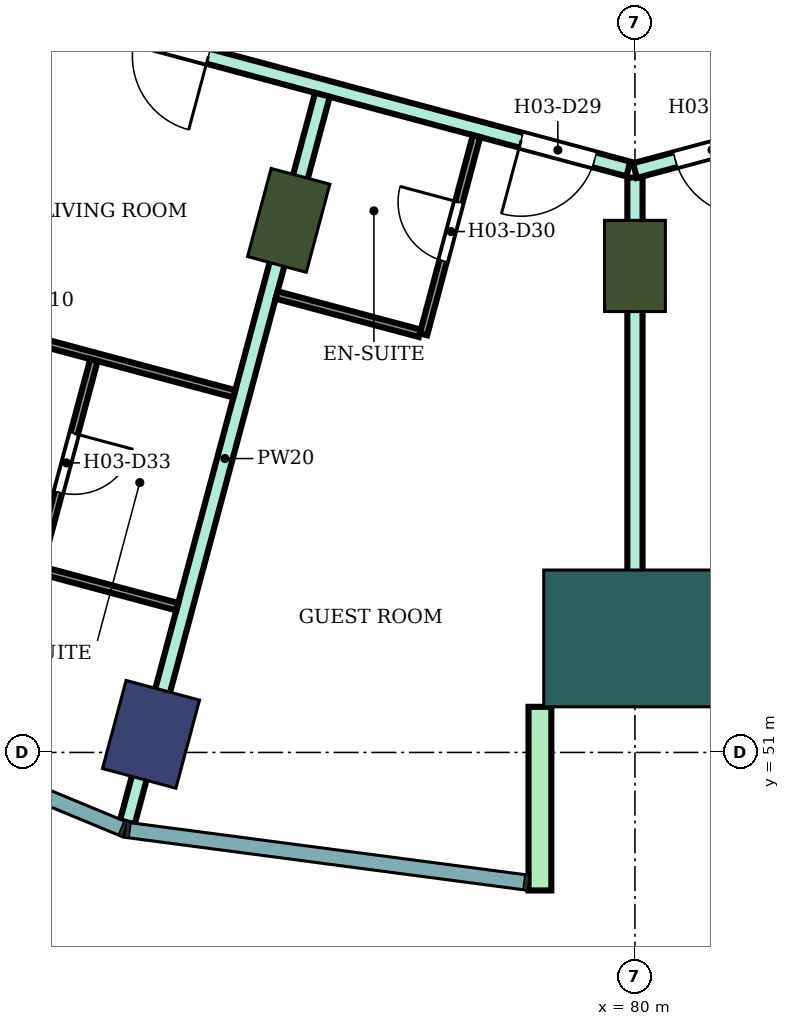
"""IFC4 building model, lengths in metres.
Left out: names, types, materials, properties, quantities, classifications, styles, units other than length and angle.
Written with IfcOpenShell. Run it as: python <this file> out.ifc"""

import sys

from ifc_helpers import new_model, si_unit, direction, frame, frame_2d, origin, origin_2d, place, context, subcontext, project, spatial, rectangle, extrude, element, fill, save


model = new_model("IFC4")
c1 = context("Model", 3, precision=1e-05, world=origin(), true_north=direction((0.0, 1.0)))
c2 = subcontext(c1, "Body", "Model", "MODEL_VIEW")
j1 = project(units=[si_unit("LENGTHUNIT", "METRE"), si_unit("PLANEANGLEUNIT", "RADIAN")], contexts=[c1])
p1 = place(None, origin())
s1 = spatial("IfcSite", under=j1, at=p1, CompositionType="ELEMENT")
p2 = place(p1, origin())
s2 = spatial("IfcBuilding", under=s1, at=p2, CompositionType="ELEMENT")
p3 = place(p2, frame((0.0, 0.0, 59.2)))
s3 = spatial("IfcBuildingStorey", under=s2, at=p3, CompositionType="ELEMENT", Elevation=59.2)
p4 = place(p3, frame((73.633, 51.238, 0.0), z_axis=(0.0, 0.0, 1.0), x_axis=(-0.258819045103, -0.965925826289, 0.0)))
e1 = element("IfcColumn", 1, at=p4, inside=s3, PredefinedType="COLUMN", context=c2, shape_type="SweptSolid", body=[
    extrude(rectangle(XDim=1.2, YDim=1.0, at=origin_2d()), origin(), (0.0, 0.0, 1.0), 3.8),
])
for number, where, z_axis, x_axis in (
    (2, (75.445, 58.0, 0.0), (0.0, 0.0, 1.0), (-0.259, -0.966, 0.0)),
    (3, (80.0, 57.4, 0.0), (0.0, 0.0, 1.0), (0.0, -1.0, 0.0)),
):
    element("IfcColumn", number, at=place(p3, frame(where, z_axis=z_axis, x_axis=x_axis)), inside=s3, PredefinedType="COLUMN", context=c2, shape_type="SweptSolid", body=[
        extrude(rectangle(XDim=1.2, YDim=0.8, at=origin_2d()), origin(), (0.0, 0.0, 1.0), 3.8),
    ])
p5 = place(p3, frame((80.0, 52.5, 0.0), z_axis=(0.0, 0.0, 1.0), x_axis=(0.0, -1.0, 0.0)))
e4 = element("IfcColumn", 4, at=p5, inside=s3, PredefinedType="COLUMN", context=c2, shape_type="SweptSolid", body=[
    extrude(rectangle(XDim=1.8, YDim=2.4, at=origin_2d()), origin(), (0.0, 0.0, 1.0), 3.8),
])
p6 = place(p3, frame((78.75, 51.6, 0.0), z_axis=(0.0, 0.0, 1.0), x_axis=(0.0, -1.0, 0.0)))
e5 = element("IfcWall", 5, at=p6, inside=s3, PredefinedType="NOTDEFINED", context=c2, shape_type="SweptSolid", body=[
    extrude(rectangle(XDim=2.416, YDim=0.3, at=frame_2d((1.208, 0.0))), origin(), (0.0, 0.0, 1.0), 3.8),
])
p7 = place(p3, frame((71.877, 60.831, 0.0), z_axis=(0.0, 0.0, 1.0), x_axis=(0.965852509869, -0.259092510851, 0.0)))
e6 = element("IfcWall", 6, at=p7, inside=s3, PredefinedType="PARTITIONING", context=c2, shape_type="SweptSolid", body=[
    extrude(rectangle(XDim=8.32, YDim=0.2, at=frame_2d((4.16, 0.0))), origin(), (0.0, 0.0, 1.0), 3.35),
])
p8 = place(p7, frame((6.86, 0.0, 0.0)))
e7 = element("IfcOpeningElement", 7, at=p8, cuts=e6, PredefinedType="OPENING", context=c2, shape_type="SweptSolid", body=[
    extrude(rectangle(XDim=1.0, YDim=2.1, at=frame_2d((0.5, 1.05))), frame((0.0, 0.11, 0.0), z_axis=(0.0, -1.0, 0.0), x_axis=(1.0, 0.0, 0.0)), (0.0, 0.0, 1.0), 0.22),
])
p9 = place(p7, frame((1.6, 0.0, 0.0)))
e8 = element("IfcOpeningElement", 8, at=p9, cuts=e6, PredefinedType="OPENING", context=c2, shape_type="SweptSolid", body=[
    extrude(rectangle(XDim=1.0, YDim=2.1, at=frame_2d((0.5, 1.05))), frame((0.0, 0.11, 0.0), z_axis=(0.0, -1.0, 0.0), x_axis=(1.0, 0.0, 0.0)), (0.0, 0.0, 1.0), 0.22),
])
p10 = place(p3, frame((73.322, 50.081, 0.0), z_axis=(0.0, 0.0, 1.0), x_axis=(0.25896431718, 0.965886889044, 0.0)))
e9 = element("IfcWall", 9, at=p10, inside=s3, PredefinedType="PARTITIONING", context=c2, shape_type="SweptSolid", body=[
    extrude(rectangle(XDim=9.909, YDim=0.2, at=frame_2d((4.955, 0.0))), origin(), (0.0, 0.0, 1.0), 3.35),
])
p11 = place(p3, frame((80.0, 51.8, 0.0), z_axis=(0.0, 0.0, 1.0), x_axis=(0.0, 1.0, 0.0)))
e10 = element("IfcWall", 10, at=p11, inside=s3, PredefinedType="PARTITIONING", context=c2, shape_type="SweptSolid", body=[
    extrude(rectangle(XDim=6.764, YDim=0.2, at=frame_2d((3.382, 0.0))), origin(), (0.0, 0.0, 1.0), 3.35),
])
p12 = place(p3, frame((80.0, 58.655, 0.0), z_axis=(0.0, 0.0, 1.0), x_axis=(0.965974635626, 0.258636817424, 0.0)))
e11 = element("IfcWall", 11, at=p12, inside=s3, PredefinedType="PARTITIONING", context=c2, shape_type="SweptSolid", body=[
    extrude(rectangle(XDim=8.36, YDim=0.2, at=frame_2d((4.18, 0.0))), origin(), (0.0, 0.0, 1.0), 3.35),
])
p13 = place(p12, frame((6.86, 0.0, 0.0)))
e12 = element("IfcOpeningElement", 12, at=p13, cuts=e11, PredefinedType="OPENING", context=c2, shape_type="SweptSolid", body=[
    extrude(rectangle(XDim=1.0, YDim=2.1, at=frame_2d((0.5, 1.05))), frame((0.0, 0.11, 0.0), z_axis=(0.0, -1.0, 0.0), x_axis=(1.0, 0.0, 0.0)), (0.0, 0.0, 1.0), 0.22),
])
p14 = place(p12, frame((0.55, 0.0, 0.0)))
e13 = element("IfcOpeningElement", 13, at=p14, cuts=e11, PredefinedType="OPENING", context=c2, shape_type="SweptSolid", body=[
    extrude(rectangle(XDim=1.0, YDim=2.1, at=frame_2d((0.5, 1.05))), frame((0.0, 0.11, 0.0), z_axis=(0.0, -1.0, 0.0), x_axis=(1.0, 0.0, 0.0)), (0.0, 0.0, 1.0), 0.22),
])
p15 = place(p3, frame((69.76, 57.051, 0.0), z_axis=(0.0, 0.0, 1.0), x_axis=(0.965880475586, -0.258988236958, 0.0)))
e14 = element("IfcWall", 14, at=p15, inside=s3, PredefinedType="PARTITIONING", context=c2, shape_type="SweptSolid", body=[
    extrude(rectangle(XDim=5.146, YDim=0.1, at=frame_2d((2.573, 0.0))), origin(), (0.0, 0.0, 1.0), 3.35),
])
p16 = place(p15, frame((1.128, 0.0, 0.0)))
e15 = element("IfcOpeningElement", 15, at=p16, cuts=e14, PredefinedType="OPENING", context=c2, shape_type="SweptSolid", body=[
    extrude(rectangle(XDim=0.9, YDim=2.1, at=frame_2d((0.45, 1.05))), frame((0.0, 0.06, 0.0), z_axis=(0.0, -1.0, 0.0), x_axis=(1.0, 0.0, 0.0)), (0.0, 0.0, 1.0), 0.12),
])
p17 = place(p3, frame((72.157, 53.457, 0.0), z_axis=(0.0, 0.0, 1.0), x_axis=(0.258975798317, 0.965883810759, 0.0)))
e16 = element("IfcWall", 16, at=p17, inside=s3, PredefinedType="PARTITIONING", context=c2, shape_type="SweptSolid", body=[
    extrude(rectangle(XDim=2.8, YDim=0.1, at=frame_2d((1.4, 0.0))), origin(), (0.0, 0.0, 1.0), 3.35),
])
p18 = place(p17, frame((1.0, 0.0, 0.0)))
e17 = element("IfcOpeningElement", 17, at=p18, cuts=e16, PredefinedType="OPENING", context=c2, shape_type="SweptSolid", body=[
    extrude(rectangle(XDim=0.8, YDim=2.1, at=frame_2d((0.4, 1.05))), frame((0.0, 0.06, 0.0), z_axis=(0.0, -1.0, 0.0), x_axis=(1.0, 0.0, 0.0)), (0.0, 0.0, 1.0), 0.12),
])
p19 = place(p3, frame((72.144, 53.409, 0.0), z_axis=(0.0, 0.0, 1.0), x_axis=(0.965907902023, -0.258885930111, 0.0)))
e18 = element("IfcWall", 18, at=p19, inside=s3, PredefinedType="PARTITIONING", context=c2, shape_type="SweptSolid", body=[
    extrude(rectangle(XDim=1.9, YDim=0.1, at=frame_2d((0.95, 0.0))), origin(), (0.0, 0.0, 1.0), 3.35),
])
p20 = place(p3, frame((75.286, 57.018, 0.0), z_axis=(0.0, 0.0, 1.0), x_axis=(0.966003902934, -0.258527483095, 0.0)))
e19 = element("IfcWall", 19, at=p20, inside=s3, PredefinedType="PARTITIONING", context=c2, shape_type="SweptSolid", body=[
    extrude(rectangle(XDim=1.95, YDim=0.1, at=frame_2d((0.975, 0.0))), origin(), (0.0, 0.0, 1.0), 3.35),
])
p21 = place(p3, frame((77.218, 56.501, 0.0), z_axis=(0.0, 0.0, 1.0), x_axis=(0.258591408257, 0.965986792651, 0.0)))
e20 = element("IfcWall", 20, at=p21, inside=s3, PredefinedType="PARTITIONING", context=c2, shape_type="SweptSolid", body=[
    extrude(rectangle(XDim=2.699, YDim=0.1, at=frame_2d((1.35, 0.0))), origin(), (0.0, 0.0, 1.0), 3.35),
])
p22 = place(p21, frame((1.0, 0.0, 0.0)))
e21 = element("IfcOpeningElement", 21, at=p22, cuts=e20, PredefinedType="OPENING", context=c2, shape_type="SweptSolid", body=[
    extrude(rectangle(XDim=0.8, YDim=2.1, at=frame_2d((0.4, 1.05))), frame((0.0, 0.06, 0.0), z_axis=(0.0, -1.0, 0.0), x_axis=(1.0, 0.0, 0.0)), (0.0, 0.0, 1.0), 0.12),
])
p23 = place(p14, frame((1.0, 0.0, 0.0), z_axis=(0.0, 0.0, 1.0), x_axis=(-1.0, 0.0, 0.0)))
e22 = element("IfcDoor", 22, at=p23, inside=s3, OperationType="SINGLE_SWING_LEFT", PredefinedType="DOOR", context=c2, shape_type="SweptSolid", body=[
    extrude(rectangle(XDim=1.0, YDim=2.1, at=frame_2d((0.5, 1.05))), frame((0.0, 0.025, 0.0), z_axis=(0.0, -1.0, 0.0), x_axis=(1.0, 0.0, 0.0)), (0.0, 0.0, 1.0), 0.05),
])
fill(e13, e22)
p24 = place(p8, frame((1.0, 0.0, 0.0), z_axis=(0.0, 0.0, 1.0), x_axis=(-1.0, 0.0, 0.0)))
e23 = element("IfcDoor", 23, at=p24, inside=s3, OperationType="SINGLE_SWING_RIGHT", PredefinedType="DOOR", context=c2, shape_type="SweptSolid", body=[
    extrude(rectangle(XDim=1.0, YDim=2.1, at=frame_2d((0.5, 1.05))), frame((0.0, 0.025, 0.0), z_axis=(0.0, -1.0, 0.0), x_axis=(1.0, 0.0, 0.0)), (0.0, 0.0, 1.0), 0.05),
])
fill(e7, e23)
p25 = place(p22, origin())
e24 = element("IfcDoor", 24, at=p25, inside=s3, OperationType="SINGLE_SWING_RIGHT", PredefinedType="DOOR", context=c2, shape_type="SweptSolid", body=[
    extrude(rectangle(XDim=0.8, YDim=2.1, at=frame_2d((0.4, 1.05))), frame((0.0, 0.025, 0.0), z_axis=(0.0, -1.0, 0.0), x_axis=(1.0, 0.0, 0.0)), (0.0, 0.0, 1.0), 0.05),
])
fill(e21, e24)
p26 = place(p9, frame((1.0, 0.0, 0.0), z_axis=(0.0, 0.0, 1.0), x_axis=(-1.0, 0.0, 0.0)))
e25 = element("IfcDoor", 25, at=p26, inside=s3, OperationType="SINGLE_SWING_LEFT", PredefinedType="DOOR", context=c2, shape_type="SweptSolid", body=[
    extrude(rectangle(XDim=1.0, YDim=2.1, at=frame_2d((0.5, 1.05))), frame((0.0, 0.025, 0.0), z_axis=(0.0, -1.0, 0.0), x_axis=(1.0, 0.0, 0.0)), (0.0, 0.0, 1.0), 0.05),
])
fill(e8, e25)
p27 = place(p18, frame((0.8, 0.0, 0.0), z_axis=(0.0, 0.0, 1.0), x_axis=(-1.0, 0.0, 0.0)))
e26 = element("IfcDoor", 26, at=p27, inside=s3, OperationType="SINGLE_SWING_LEFT", PredefinedType="DOOR", context=c2, shape_type="SweptSolid", body=[
    extrude(rectangle(XDim=0.8, YDim=2.1, at=frame_2d((0.4, 1.05))), frame((0.0, 0.025, 0.0), z_axis=(0.0, -1.0, 0.0), x_axis=(1.0, 0.0, 0.0)), (0.0, 0.0, 1.0), 0.05),
])
fill(e17, e26)
save(model, sys.argv[1])
